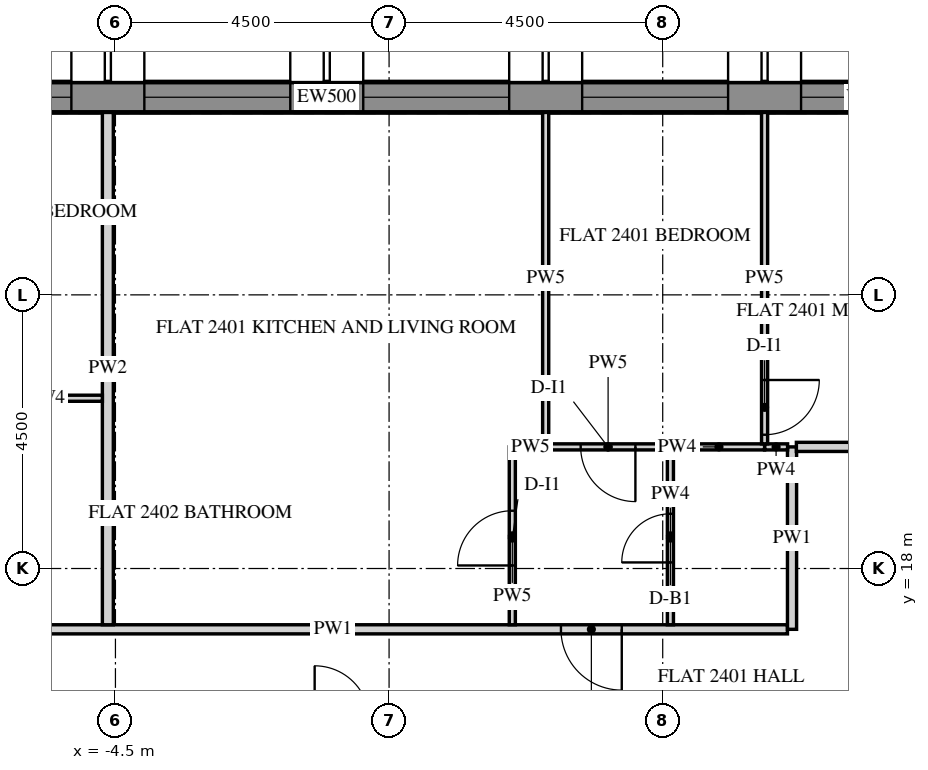
"""IFC4 building model, lengths in metres.
Left out: names, types, materials, properties, quantities, classifications, styles, units other than length and angle.
Written with IfcOpenShell. Run it as: python <this file> out.ifc"""

import sys

from ifc_helpers import new_model, si_unit, direction, frame, frame_2d, origin, place, context, subcontext, project, spatial, polyline, rectangle, outline, extrude, element, fill, save


model = new_model("IFC4")
c1 = context("Model", 3, precision=1e-05, world=origin(), true_north=direction((0.0, 1.0)))
c2 = subcontext(c1, "Body", "Model", "MODEL_VIEW")
j1 = project(units=[si_unit("LENGTHUNIT", "METRE"), si_unit("PLANEANGLEUNIT", "RADIAN")], contexts=[c1])
p1 = place(None, origin())
s1 = spatial("IfcSite", under=j1, at=p1, CompositionType="ELEMENT")
p2 = place(p1, origin())
s2 = spatial("IfcBuilding", under=s1, at=p2, CompositionType="ELEMENT")
p3 = place(p2, frame((0.0, 0.0, 303.0)))
s3 = spatial("IfcBuildingStorey", under=s2, at=p3, CompositionType="ELEMENT", Elevation=303.0)
p4 = place(p3, frame((11.698, 25.75, -0.15), z_axis=(0.0, 0.0, 1.0), x_axis=(-1.0, 0.0, 0.0)))
e1 = element("IfcWall", 1, at=p4, inside=s3, PredefinedType="SOLIDWALL", context=c2, shape_type="SweptSolid", body=[
    extrude(outline(polyline([(-0.021, -0.25), (25.468, -0.25), (25.421, 0.25), (0.021, 0.25), (-0.021, -0.25)])), origin(), (0.0, 0.0, 1.0), 3.9),
])
p5 = place(p4, frame((2.522, 0.0, 0.75)))
e2 = element("IfcOpeningElement", 2, at=p5, cuts=e1, PredefinedType="OPENING", context=c2, shape_type="SweptSolid", body=[
    extrude(rectangle(XDim=2.4, YDim=2.7, at=frame_2d((1.2, 1.35))), frame((0.0, 0.26, 0.0), z_axis=(0.0, -1.0, 0.0), x_axis=(1.0, 0.0, 0.0)), (0.0, 0.0, 1.0), 0.52),
])
p6 = place(p4, frame((6.122, 0.0, 0.75)))
e3 = element("IfcOpeningElement", 3, at=p6, cuts=e1, PredefinedType="OPENING", context=c2, shape_type="SweptSolid", body=[
    extrude(rectangle(XDim=2.4, YDim=2.7, at=frame_2d((1.2, 1.35))), frame((0.0, 0.26, 0.0), z_axis=(0.0, -1.0, 0.0), x_axis=(1.0, 0.0, 0.0)), (0.0, 0.0, 1.0), 0.52),
])
p7 = place(p4, frame((9.722, 0.0, 0.75)))
e4 = element("IfcOpeningElement", 4, at=p7, cuts=e1, PredefinedType="OPENING", context=c2, shape_type="SweptSolid", body=[
    extrude(rectangle(XDim=2.4, YDim=2.7, at=frame_2d((1.2, 1.35))), frame((0.0, 0.26, 0.0), z_axis=(0.0, -1.0, 0.0), x_axis=(1.0, 0.0, 0.0)), (0.0, 0.0, 1.0), 0.52),
])
p8 = place(p4, frame((13.323, 0.0, 0.75)))
e5 = element("IfcOpeningElement", 5, at=p8, cuts=e1, PredefinedType="OPENING", context=c2, shape_type="SweptSolid", body=[
    extrude(rectangle(XDim=2.4, YDim=2.7, at=frame_2d((1.2, 1.35))), frame((0.0, 0.26, 0.0), z_axis=(0.0, -1.0, 0.0), x_axis=(1.0, 0.0, 0.0)), (0.0, 0.0, 1.0), 0.52),
])
p9 = place(p4, frame((16.922, 0.0, 0.75)))
e6 = element("IfcOpeningElement", 6, at=p9, cuts=e1, PredefinedType="OPENING", context=c2, shape_type="SweptSolid", body=[
    extrude(rectangle(XDim=2.4, YDim=2.7, at=frame_2d((1.2, 1.35))), frame((0.0, 0.26, 0.0), z_axis=(0.0, -1.0, 0.0), x_axis=(1.0, 0.0, 0.0)), (0.0, 0.0, 1.0), 0.52),
])
p10 = place(p4, frame((20.522, 0.0, 0.75)))
e7 = element("IfcOpeningElement", 7, at=p10, cuts=e1, PredefinedType="OPENING", context=c2, shape_type="SweptSolid", body=[
    extrude(rectangle(XDim=2.4, YDim=2.7, at=frame_2d((1.2, 1.35))), frame((0.0, 0.26, 0.0), z_axis=(0.0, -1.0, 0.0), x_axis=(1.0, 0.0, 0.0)), (0.0, 0.0, 1.0), 0.52),
])
p11 = place(p3, frame((6.351, 11.0, -0.15), z_axis=(0.0, 0.0, 1.0), x_axis=(0.499998894578, 0.866026041999, 0.0)))
e8 = element("IfcWall", 8, at=p11, inside=s3, PredefinedType="SHEAR", context=c2, shape_type="SweptSolid", body=[
    extrude(rectangle(XDim=15.544, YDim=0.4, at=frame_2d((7.772, 0.0))), origin(), (0.0, 0.0, 1.0), 3.9),
])
p12 = place(p11, frame((6.872, 0.0, 0.15)))
e9 = element("IfcOpeningElement", 9, at=p12, cuts=e8, PredefinedType="OPENING", context=c2, shape_type="SweptSolid", body=[
    extrude(rectangle(XDim=1.8, YDim=2.4, at=frame_2d((0.9, 1.2))), frame((0.0, 0.21, 0.0), z_axis=(0.0, -1.0, 0.0), x_axis=(1.0, 0.0, 0.0)), (0.0, 0.0, 1.0), 0.42),
])
p13 = place(p3, frame((6.552, 17.0, 0.0), z_axis=(0.0, 0.0, 1.0), x_axis=(-1.0, 0.0, 0.0)))
e10 = element("IfcWall", 10, at=p13, inside=s3, PredefinedType="PARTITIONING", context=c2, shape_type="SweptSolid", body=[
    extrude(rectangle(XDim=14.949, YDim=0.15, at=frame_2d((7.475, 0.0))), origin(), (0.0, 0.0, 1.0), 2.988),
])
p14 = place(p13, frame((2.725, 0.0, 0.0)))
e11 = element("IfcOpeningElement", 11, at=p14, cuts=e10, PredefinedType="OPENING", context=c2, shape_type="SweptSolid", body=[
    extrude(rectangle(XDim=1.0, YDim=2.1, at=frame_2d((0.5, 1.05))), frame((0.0, 0.085, 0.0), z_axis=(0.0, -1.0, 0.0), x_axis=(1.0, 0.0, 0.0)), (0.0, 0.0, 1.0), 0.17),
])
p15 = place(p13, frame((13.799, 0.0, 0.0)))
e12 = element("IfcOpeningElement", 12, at=p15, cuts=e10, PredefinedType="OPENING", context=c2, shape_type="SweptSolid", body=[
    extrude(rectangle(XDim=1.0, YDim=2.1, at=frame_2d((0.5, 1.05))), frame((0.0, 0.085, 0.0), z_axis=(0.0, -1.0, 0.0), x_axis=(1.0, 0.0, 0.0)), (0.0, 0.0, 1.0), 0.17),
])
p16 = place(p3, frame((6.627, 20.0, 0.0), z_axis=(0.0, 0.0, 1.0), x_axis=(0.0, -1.0, 0.0)))
e13 = element("IfcWall", 13, at=p16, inside=s3, PredefinedType="PARTITIONING", context=c2, shape_type="SweptSolid", body=[
    extrude(rectangle(XDim=3.0, YDim=0.15, at=frame_2d((1.5, 0.0))), origin(), (0.0, 0.0, 1.0), 2.988),
])
p17 = place(p3, frame((9.497, 20.0, 0.0), z_axis=(0.0, 0.0, 1.0), x_axis=(-1.0, 0.0, 0.0)))
e14 = element("IfcWall", 14, at=p17, inside=s3, PredefinedType="PARTITIONING", context=c2, shape_type="SweptSolid", body=[
    extrude(rectangle(XDim=2.799, YDim=0.15, at=frame_2d((1.399, 0.0))), origin(), (0.0, 0.0, 1.0), 2.988),
])
p18 = place(p3, frame((2.027, 17.075, 0.0), z_axis=(0.0, 0.0, 1.0), x_axis=(0.0, 1.0, 0.0)))
e15 = element("IfcWall", 15, at=p18, inside=s3, PredefinedType="PARTITIONING", context=c2, shape_type="SweptSolid", body=[
    extrude(rectangle(XDim=2.925, YDim=0.1, at=frame_2d((1.462, 0.0))), origin(), (0.0, 0.0, 1.0), 2.988),
])
p19 = place(p18, frame((0.975, 0.0, 0.0)))
e16 = element("IfcOpeningElement", 16, at=p19, cuts=e15, PredefinedType="OPENING", context=c2, shape_type="SweptSolid", body=[
    extrude(rectangle(XDim=0.9, YDim=2.1, at=frame_2d((0.45, 1.05))), frame((0.0, 0.06, 0.0), z_axis=(0.0, -1.0, 0.0), x_axis=(1.0, 0.0, 0.0)), (0.0, 0.0, 1.0), 0.12),
])
p20 = place(p3, frame((2.077, 20.0, 0.0), z_axis=(0.0, 0.0, 1.0), x_axis=(1.0, 0.0, 0.0)))
e17 = element("IfcWall", 17, at=p20, inside=s3, PredefinedType="PARTITIONING", context=c2, shape_type="SweptSolid", body=[
    extrude(rectangle(XDim=0.5, YDim=0.1, at=frame_2d((0.25, 0.0))), origin(), (0.0, 0.0, 1.0), 2.988),
])
p21 = place(p3, frame((2.575, 20.05, 0.0), z_axis=(0.0, 0.0, 1.0), x_axis=(0.0, 1.0, 0.0)))
e18 = element("IfcWall", 18, at=p21, inside=s3, PredefinedType="PARTITIONING", context=c2, shape_type="SweptSolid", body=[
    extrude(rectangle(XDim=5.45, YDim=0.1, at=frame_2d((2.725, 0.0))), origin(), (0.0, 0.0, 1.0), 2.988),
])
p22 = place(p3, frame((-4.625, 25.5, 0.0), z_axis=(0.0, 0.0, 1.0), x_axis=(0.0, -1.0, 0.0)))
e19 = element("IfcWall", 19, at=p22, inside=s3, PredefinedType="PARTITIONING", context=c2, shape_type="SweptSolid", body=[
    extrude(rectangle(XDim=8.425, YDim=0.18, at=frame_2d((4.212, 0.0))), origin(), (0.0, 0.0, 1.0), 2.988),
])
p23 = place(p3, frame((4.627, 17.075, 0.0), z_axis=(0.0, 0.0, 1.0), x_axis=(0.0, 1.0, 0.0)))
e20 = element("IfcWall", 20, at=p23, inside=s3, PredefinedType="PARTITIONING", context=c2, shape_type="SweptSolid", body=[
    extrude(rectangle(XDim=2.925, YDim=0.1, at=frame_2d((1.462, 0.0))), origin(), (0.0, 0.0, 1.0), 2.988),
])
p24 = place(p23, frame((1.025, 0.0, 0.0)))
e21 = element("IfcOpeningElement", 21, at=p24, cuts=e20, PredefinedType="OPENING", context=c2, shape_type="SweptSolid", body=[
    extrude(rectangle(XDim=0.8, YDim=2.1, at=frame_2d((0.4, 1.05))), frame((0.0, 0.06, 0.0), z_axis=(0.0, -1.0, 0.0), x_axis=(1.0, 0.0, 0.0)), (0.0, 0.0, 1.0), 0.12),
])
p25 = place(p3, frame((4.579, 20.0, 0.0), z_axis=(0.0, 0.0, 1.0), x_axis=(-1.0, 0.0, 0.0)))
e22 = element("IfcWall", 22, at=p25, inside=s3, PredefinedType="PARTITIONING", context=c2, shape_type="SweptSolid", body=[
    extrude(rectangle(XDim=1.953, YDim=0.1, at=frame_2d((0.977, 0.0))), origin(), (0.0, 0.0, 1.0), 2.988),
])
p26 = place(p25, frame((0.528, 0.0, 0.0)))
e23 = element("IfcOpeningElement", 23, at=p26, cuts=e22, PredefinedType="OPENING", context=c2, shape_type="SweptSolid", body=[
    extrude(rectangle(XDim=0.9, YDim=2.1, at=frame_2d((0.45, 1.05))), frame((0.0, 0.06, 0.0), z_axis=(0.0, -1.0, 0.0), x_axis=(1.0, 0.0, 0.0)), (0.0, 0.0, 1.0), 0.12),
])
p27 = place(p3, frame((6.554, 20.0, 0.0), z_axis=(0.0, 0.0, 1.0), x_axis=(-1.0, 0.0, 0.0)))
e24 = element("IfcWall", 24, at=p27, inside=s3, PredefinedType="PARTITIONING", context=c2, shape_type="SweptSolid", body=[
    extrude(rectangle(XDim=0.378, YDim=0.1, at=frame_2d((0.189, 0.0))), origin(), (0.0, 0.0, 1.0), 2.988),
])
p28 = place(p3, frame((6.175, 20.0, 0.0), z_axis=(0.0, 0.0, 1.0), x_axis=(-1.0, 0.0, 0.0)))
e25 = element("IfcWall", 25, at=p28, inside=s3, PredefinedType="PARTITIONING", context=c2, shape_type="SweptSolid", body=[
    extrude(rectangle(XDim=1.501, YDim=0.1, at=frame_2d((0.75, 0.0))), origin(), (0.0, 0.0, 1.0), 2.988),
])
p29 = place(p3, frame((6.175, 25.5, 0.0), z_axis=(0.0, 0.0, 1.0), x_axis=(0.0, -1.0, 0.0)))
e26 = element("IfcWall", 26, at=p29, inside=s3, PredefinedType="PARTITIONING", context=c2, shape_type="SweptSolid", body=[
    extrude(rectangle(XDim=5.45, YDim=0.1, at=frame_2d((2.725, 0.0))), origin(), (0.0, 0.0, 1.0), 2.988),
])
p30 = place(p29, frame((4.4, 0.0, 0.0)))
e27 = element("IfcOpeningElement", 27, at=p30, cuts=e26, PredefinedType="OPENING", context=c2, shape_type="SweptSolid", body=[
    extrude(rectangle(XDim=0.9, YDim=2.1, at=frame_2d((0.45, 1.05))), frame((0.0, 0.06, 0.0), z_axis=(0.0, -1.0, 0.0), x_axis=(1.0, 0.0, 0.0)), (0.0, 0.0, 1.0), 0.12),
])
p31 = place(p3, frame((-4.715, 20.8, 0.0), z_axis=(0.0, 0.0, 1.0), x_axis=(-1.0, 0.0, 0.0)))
e28 = element("IfcWall", 28, at=p31, inside=s3, PredefinedType="PARTITIONING", context=c2, shape_type="SweptSolid", body=[
    extrude(rectangle(XDim=1.862, YDim=0.1, at=frame_2d((0.931, 0.0))), origin(), (0.0, 0.0, 1.0), 2.988),
])
p32 = place(p5, frame((0.0, 0.18, 0.0)))
e29 = element("IfcWindow", 29, at=p32, inside=s3, PartitioningType="DOUBLE_PANEL_VERTICAL", PredefinedType="WINDOW", context=c2, shape_type="SweptSolid", body=[
    extrude(rectangle(XDim=2.4, YDim=2.7, at=frame_2d((1.2, 1.35))), frame((0.0, 0.03, 0.0), z_axis=(0.0, -1.0, 0.0), x_axis=(1.0, 0.0, 0.0)), (0.0, 0.0, 1.0), 0.06),
])
fill(e2, e29)
p33 = place(p6, frame((0.0, 0.18, 0.0)))
e30 = element("IfcWindow", 30, at=p33, inside=s3, PartitioningType="DOUBLE_PANEL_VERTICAL", PredefinedType="WINDOW", context=c2, shape_type="SweptSolid", body=[
    extrude(rectangle(XDim=2.4, YDim=2.7, at=frame_2d((1.2, 1.35))), frame((0.0, 0.03, 0.0), z_axis=(0.0, -1.0, 0.0), x_axis=(1.0, 0.0, 0.0)), (0.0, 0.0, 1.0), 0.06),
])
fill(e3, e30)
p34 = place(p7, frame((0.0, 0.18, 0.0)))
e31 = element("IfcWindow", 31, at=p34, inside=s3, PartitioningType="DOUBLE_PANEL_VERTICAL", PredefinedType="WINDOW", context=c2, shape_type="SweptSolid", body=[
    extrude(rectangle(XDim=2.4, YDim=2.7, at=frame_2d((1.2, 1.35))), frame((0.0, 0.03, 0.0), z_axis=(0.0, -1.0, 0.0), x_axis=(1.0, 0.0, 0.0)), (0.0, 0.0, 1.0), 0.06),
])
fill(e4, e31)
p35 = place(p8, frame((0.0, 0.18, 0.0)))
e32 = element("IfcWindow", 32, at=p35, inside=s3, PartitioningType="DOUBLE_PANEL_VERTICAL", PredefinedType="WINDOW", context=c2, shape_type="SweptSolid", body=[
    extrude(rectangle(XDim=2.4, YDim=2.7, at=frame_2d((1.2, 1.35))), frame((0.0, 0.03, 0.0), z_axis=(0.0, -1.0, 0.0), x_axis=(1.0, 0.0, 0.0)), (0.0, 0.0, 1.0), 0.06),
])
fill(e5, e32)
p36 = place(p9, frame((0.0, 0.18, 0.0)))
e33 = element("IfcWindow", 33, at=p36, inside=s3, PartitioningType="DOUBLE_PANEL_VERTICAL", PredefinedType="WINDOW", context=c2, shape_type="SweptSolid", body=[
    extrude(rectangle(XDim=2.4, YDim=2.7, at=frame_2d((1.2, 1.35))), frame((0.0, 0.03, 0.0), z_axis=(0.0, -1.0, 0.0), x_axis=(1.0, 0.0, 0.0)), (0.0, 0.0, 1.0), 0.06),
])
fill(e6, e33)
p37 = place(p14, origin())
e34 = element("IfcDoor", 34, at=p37, inside=s3, OperationType="SINGLE_SWING_RIGHT", PredefinedType="DOOR", context=c2, shape_type="SweptSolid", body=[
    extrude(rectangle(XDim=1.0, YDim=2.1, at=frame_2d((0.5, 1.05))), frame((0.0, 0.025, 0.0), z_axis=(0.0, -1.0, 0.0), x_axis=(1.0, 0.0, 0.0)), (0.0, 0.0, 1.0), 0.05),
])
fill(e11, e34)
p38 = place(p24, origin())
e35 = element("IfcDoor", 35, at=p38, inside=s3, OperationType="SINGLE_SWING_RIGHT", PredefinedType="DOOR", context=c2, shape_type="SweptSolid", body=[
    extrude(rectangle(XDim=0.8, YDim=2.1, at=frame_2d((0.4, 1.05))), frame((0.0, 0.025, 0.0), z_axis=(0.0, -1.0, 0.0), x_axis=(1.0, 0.0, 0.0)), (0.0, 0.0, 1.0), 0.05),
])
fill(e21, e35)
p39 = place(p19, origin())
e36 = element("IfcDoor", 36, at=p39, inside=s3, OperationType="SINGLE_SWING_RIGHT", PredefinedType="DOOR", context=c2, shape_type="SweptSolid", body=[
    extrude(rectangle(XDim=0.9, YDim=2.1, at=frame_2d((0.45, 1.05))), frame((0.0, 0.025, 0.0), z_axis=(0.0, -1.0, 0.0), x_axis=(1.0, 0.0, 0.0)), (0.0, 0.0, 1.0), 0.05),
])
fill(e16, e36)
p40 = place(p30, origin())
e37 = element("IfcDoor", 37, at=p40, inside=s3, OperationType="SINGLE_SWING_RIGHT", PredefinedType="DOOR", context=c2, shape_type="SweptSolid", body=[
    extrude(rectangle(XDim=0.9, YDim=2.1, at=frame_2d((0.45, 1.05))), frame((0.0, 0.025, 0.0), z_axis=(0.0, -1.0, 0.0), x_axis=(1.0, 0.0, 0.0)), (0.0, 0.0, 1.0), 0.05),
])
fill(e27, e37)
p41 = place(p26, origin())
e38 = element("IfcDoor", 38, at=p41, inside=s3, OperationType="SINGLE_SWING_RIGHT", PredefinedType="DOOR", context=c2, shape_type="SweptSolid", body=[
    extrude(rectangle(XDim=0.9, YDim=2.1, at=frame_2d((0.45, 1.05))), frame((0.0, 0.025, 0.0), z_axis=(0.0, -1.0, 0.0), x_axis=(1.0, 0.0, 0.0)), (0.0, 0.0, 1.0), 0.05),
])
fill(e23, e38)
save(model, sys.argv[1])
